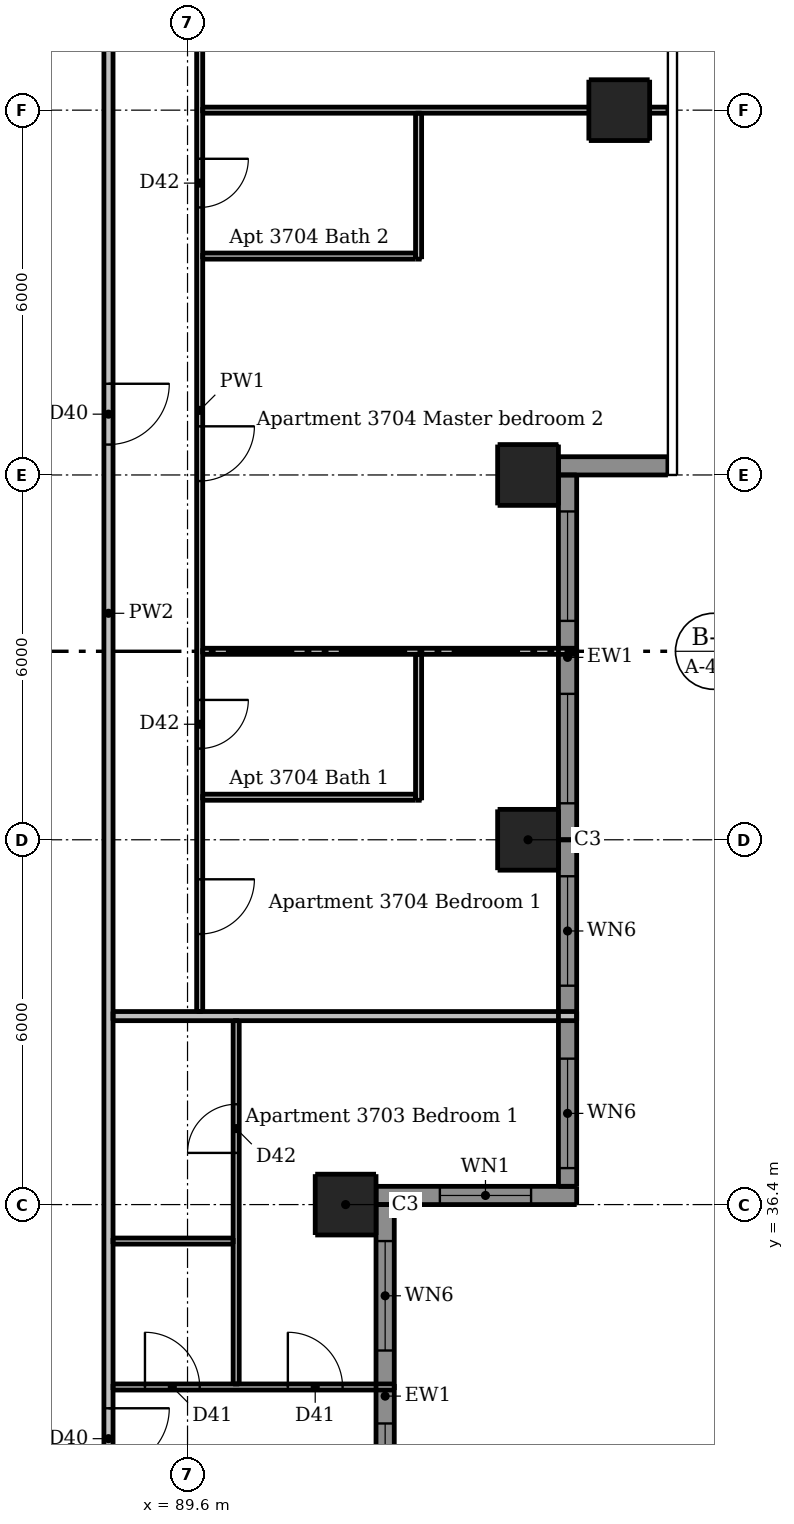
"""IFC4 building model, lengths in metres.
Left out: names, types, materials, properties, quantities, classifications, styles, units other than length and angle.
Written with IfcOpenShell. Run it as: python <this file> out.ifc"""

import sys

from ifc_helpers import new_model, si_unit, direction, frame, frame_2d, origin, origin_2d, place, context, subcontext, project, spatial, rectangle, extrude, element, fill, save


model = new_model("IFC4")
c1 = context("Model", 3, precision=1e-05, world=origin(), true_north=direction((0.0, 1.0)))
c2 = subcontext(c1, "Body", "Model", "MODEL_VIEW")
j1 = project(units=[si_unit("LENGTHUNIT", "METRE"), si_unit("PLANEANGLEUNIT", "RADIAN")], contexts=[c1])
p1 = place(None, origin())
s1 = spatial("IfcSite", under=j1, at=p1, CompositionType="ELEMENT")
p2 = place(p1, origin())
s2 = spatial("IfcBuilding", under=s1, at=p2, CompositionType="ELEMENT")
p3 = place(p2, frame((0.0, 0.0, 140.5)))
s3 = spatial("IfcBuildingStorey", under=s2, at=p3, CompositionType="ELEMENT", Elevation=140.5)
for number, where, z_axis, x_axis in (
    (1, (92.2, 36.4, 0.0), (0.0, 0.0, 1.0), (1.0, 0.0, 0.0)),
    (2, (95.2, 42.4, 0.0), (0.0, 0.0, 1.0), (1.0, 0.0, 0.0)),
    (3, (95.2, 48.4, 0.0), (0.0, 0.0, 1.0), (1.0, 0.0, 0.0)),
    (4, (96.7, 54.4, 0.0), (0.0, 0.0, 1.0), (1.0, 0.0, 0.0)),
):
    element("IfcColumn", number, at=place(p3, frame(where, z_axis=z_axis, x_axis=x_axis)), inside=s3, PredefinedType="COLUMN", context=c2, shape_type="SweptSolid", body=[
        extrude(rectangle(XDim=1.0, YDim=1.0, at=origin_2d()), origin(), (0.0, 0.0, 1.0), 3.05),
    ])
p4 = place(p3, frame((92.7, 36.55, 0.0), z_axis=(0.0, 0.0, 1.0), x_axis=(1.0, 0.0, 0.0)))
e5 = element("IfcWall", 5, at=p4, inside=s3, PredefinedType="SOLIDWALL", context=c2, shape_type="SweptSolid", body=[
    extrude(rectangle(XDim=3.3, YDim=0.3, at=frame_2d((1.65, 0.0))), origin(), (0.0, 0.0, 1.0), 3.05),
])
p5 = place(p4, frame((1.05, 0.0, 0.9)))
e6 = element("IfcOpeningElement", 6, at=p5, cuts=e5, PredefinedType="OPENING", context=c2, shape_type="SweptSolid", body=[
    extrude(rectangle(XDim=1.5, YDim=1.5, at=frame_2d((0.75, 0.75))), frame((0.0, 0.16, 0.0), z_axis=(0.0, -1.0, 0.0), x_axis=(1.0, 0.0, 0.0)), (0.0, 0.0, 1.0), 0.32),
])
p6 = place(p3, frame((95.7, 48.55, 0.0), z_axis=(0.0, 0.0, 1.0), x_axis=(1.0, 0.0, 0.0)))
e7 = element("IfcWall", 7, at=p6, inside=s3, PredefinedType="SOLIDWALL", context=c2, shape_type="SweptSolid", body=[
    extrude(rectangle(XDim=1.8, YDim=0.3, at=frame_2d((0.9, 0.0))), origin(), (0.0, 0.0, 1.0), 3.05),
])
p7 = place(p3, frame((92.85, 30.1, 0.0), z_axis=(0.0, 0.0, 1.0), x_axis=(0.0, 1.0, 0.0)))
e8 = element("IfcWall", 8, at=p7, inside=s3, PredefinedType="SOLIDWALL", context=c2, shape_type="SweptSolid", body=[
    extrude(rectangle(XDim=6.3, YDim=0.3, at=frame_2d((3.15, 0.0))), origin(), (0.0, 0.0, 1.0), 3.05),
])
p8 = place(p7, frame((0.9, 0.0, 0.15)))
e9 = element("IfcOpeningElement", 9, at=p8, cuts=e8, PredefinedType="OPENING", context=c2, shape_type="SweptSolid", body=[
    extrude(rectangle(XDim=1.8, YDim=2.1, at=frame_2d((0.9, 1.05))), frame((0.0, 0.16, 0.0), z_axis=(0.0, -1.0, 0.0), x_axis=(1.0, 0.0, 0.0)), (0.0, 0.0, 1.0), 0.32),
])
p9 = place(p7, frame((3.9, 0.0, 0.15)))
e10 = element("IfcOpeningElement", 10, at=p9, cuts=e8, PredefinedType="OPENING", context=c2, shape_type="SweptSolid", body=[
    extrude(rectangle(XDim=1.8, YDim=2.1, at=frame_2d((0.9, 1.05))), frame((0.0, 0.16, 0.0), z_axis=(0.0, -1.0, 0.0), x_axis=(1.0, 0.0, 0.0)), (0.0, 0.0, 1.0), 0.32),
])
p10 = place(p3, frame((95.85, 36.7, 0.0), z_axis=(0.0, 0.0, 1.0), x_axis=(0.0, 1.0, 0.0)))
e11 = element("IfcWall", 11, at=p10, inside=s3, PredefinedType="SOLIDWALL", context=c2, shape_type="SweptSolid", body=[
    extrude(rectangle(XDim=5.7, YDim=0.3, at=frame_2d((2.85, 0.0))), origin(), (0.0, 0.0, 1.0), 3.05),
])
p11 = place(p10, frame((0.3, 0.0, 0.15)))
e12 = element("IfcOpeningElement", 12, at=p11, cuts=e11, PredefinedType="OPENING", context=c2, shape_type="SweptSolid", body=[
    extrude(rectangle(XDim=1.8, YDim=2.1, at=frame_2d((0.9, 1.05))), frame((0.0, 0.16, 0.0), z_axis=(0.0, -1.0, 0.0), x_axis=(1.0, 0.0, 0.0)), (0.0, 0.0, 1.0), 0.32),
])
p12 = place(p10, frame((3.3, 0.0, 0.15)))
e13 = element("IfcOpeningElement", 13, at=p12, cuts=e11, PredefinedType="OPENING", context=c2, shape_type="SweptSolid", body=[
    extrude(rectangle(XDim=1.8, YDim=2.1, at=frame_2d((0.9, 1.05))), frame((0.0, 0.16, 0.0), z_axis=(0.0, -1.0, 0.0), x_axis=(1.0, 0.0, 0.0)), (0.0, 0.0, 1.0), 0.32),
])
p13 = place(p3, frame((95.85, 42.4, 0.0), z_axis=(0.0, 0.0, 1.0), x_axis=(0.0, 1.0, 0.0)))
e14 = element("IfcWall", 14, at=p13, inside=s3, PredefinedType="SOLIDWALL", context=c2, shape_type="SweptSolid", body=[
    extrude(rectangle(XDim=6.0, YDim=0.3, at=frame_2d((3.0, 0.0))), origin(), (0.0, 0.0, 1.0), 3.05),
])
p14 = place(p13, frame((0.6, 0.0, 0.15)))
e15 = element("IfcOpeningElement", 15, at=p14, cuts=e14, PredefinedType="OPENING", context=c2, shape_type="SweptSolid", body=[
    extrude(rectangle(XDim=1.8, YDim=2.1, at=frame_2d((0.9, 1.05))), frame((0.0, 0.16, 0.0), z_axis=(0.0, -1.0, 0.0), x_axis=(1.0, 0.0, 0.0)), (0.0, 0.0, 1.0), 0.32),
])
p15 = place(p13, frame((3.6, 0.0, 0.15)))
e16 = element("IfcOpeningElement", 16, at=p15, cuts=e14, PredefinedType="OPENING", context=c2, shape_type="SweptSolid", body=[
    extrude(rectangle(XDim=1.8, YDim=2.1, at=frame_2d((0.9, 1.05))), frame((0.0, 0.16, 0.0), z_axis=(0.0, -1.0, 0.0), x_axis=(1.0, 0.0, 0.0)), (0.0, 0.0, 1.0), 0.32),
])
p16 = place(p3, frame((89.8, 59.35, 0.0), z_axis=(0.0, 0.0, 1.0), x_axis=(0.0, -1.0, 0.0)))
e17 = element("IfcWall", 17, at=p16, inside=s3, PredefinedType="PARTITIONING", context=c2, shape_type="SweptSolid", body=[
    extrude(rectangle(XDim=19.775, YDim=0.1, at=frame_2d((9.888, 0.0))), origin(), (0.0, 0.0, 1.0), 3.05),
])
p17 = place(p16, frame((2.7, 0.0, 0.0)))
e18 = element("IfcOpeningElement", 18, at=p17, cuts=e17, PredefinedType="OPENING", context=c2, shape_type="SweptSolid", body=[
    extrude(rectangle(XDim=0.9, YDim=2.1, at=frame_2d((0.45, 1.05))), frame((0.0, 0.06, 0.0), z_axis=(0.0, -1.0, 0.0), x_axis=(1.0, 0.0, 0.0)), (0.0, 0.0, 1.0), 0.12),
])
p18 = place(p16, frame((17.6, 0.0, 0.0)))
e19 = element("IfcOpeningElement", 19, at=p18, cuts=e17, PredefinedType="OPENING", context=c2, shape_type="SweptSolid", body=[
    extrude(rectangle(XDim=0.9, YDim=2.1, at=frame_2d((0.45, 1.05))), frame((0.0, 0.06, 0.0), z_axis=(0.0, -1.0, 0.0), x_axis=(1.0, 0.0, 0.0)), (0.0, 0.0, 1.0), 0.12),
])
p19 = place(p16, frame((10.15, 0.0, 0.0)))
e20 = element("IfcOpeningElement", 20, at=p19, cuts=e17, PredefinedType="OPENING", context=c2, shape_type="SweptSolid", body=[
    extrude(rectangle(XDim=0.9, YDim=2.1, at=frame_2d((0.45, 1.05))), frame((0.0, 0.06, 0.0), z_axis=(0.0, -1.0, 0.0), x_axis=(1.0, 0.0, 0.0)), (0.0, 0.0, 1.0), 0.12),
])
p20 = place(p16, frame((14.65, 0.0, 0.0)))
e21 = element("IfcOpeningElement", 21, at=p20, cuts=e17, PredefinedType="OPENING", context=c2, shape_type="SweptSolid", body=[
    extrude(rectangle(XDim=0.8, YDim=2.1, at=frame_2d((0.4, 1.05))), frame((0.0, 0.06, 0.0), z_axis=(0.0, -1.0, 0.0), x_axis=(1.0, 0.0, 0.0)), (0.0, 0.0, 1.0), 0.12),
])
p21 = place(p16, frame((5.75, 0.0, 0.0)))
e22 = element("IfcOpeningElement", 22, at=p21, cuts=e17, PredefinedType="OPENING", context=c2, shape_type="SweptSolid", body=[
    extrude(rectangle(XDim=0.8, YDim=2.1, at=frame_2d((0.4, 1.05))), frame((0.0, 0.06, 0.0), z_axis=(0.0, -1.0, 0.0), x_axis=(1.0, 0.0, 0.0)), (0.0, 0.0, 1.0), 0.12),
])
p22 = place(p3, frame((90.4, 33.45, 0.0), z_axis=(0.0, 0.0, 1.0), x_axis=(0.0, 1.0, 0.0)))
e23 = element("IfcWall", 23, at=p22, inside=s3, PredefinedType="PARTITIONING", context=c2, shape_type="SweptSolid", body=[
    extrude(rectangle(XDim=5.975, YDim=0.1, at=frame_2d((2.988, 0.0))), origin(), (0.0, 0.0, 1.0), 3.05),
])
p23 = place(p22, frame((3.8, 0.0, 0.0)))
e24 = element("IfcOpeningElement", 24, at=p23, cuts=e23, PredefinedType="OPENING", context=c2, shape_type="SweptSolid", body=[
    extrude(rectangle(XDim=0.8, YDim=2.1, at=frame_2d((0.4, 1.05))), frame((0.0, 0.06, 0.0), z_axis=(0.0, -1.0, 0.0), x_axis=(1.0, 0.0, 0.0)), (0.0, 0.0, 1.0), 0.12),
])
p24 = place(p3, frame((93.4, 43.05, 0.0), z_axis=(0.0, 0.0, 1.0), x_axis=(0.0, 1.0, 0.0)))
e25 = element("IfcWall", 25, at=p24, inside=s3, PredefinedType="PARTITIONING", context=c2, shape_type="SweptSolid", body=[
    extrude(rectangle(XDim=2.4, YDim=0.1, at=frame_2d((1.2, 0.0))), origin(), (0.0, 0.0, 1.0), 3.05),
])
p25 = place(p3, frame((93.4, 51.95, 0.0), z_axis=(0.0, 0.0, 1.0), x_axis=(0.0, 1.0, 0.0)))
e26 = element("IfcWall", 26, at=p25, inside=s3, PredefinedType="PARTITIONING", context=c2, shape_type="SweptSolid", body=[
    extrude(rectangle(XDim=2.4, YDim=0.1, at=frame_2d((1.2, 0.0))), origin(), (0.0, 0.0, 1.0), 3.05),
])
p26 = place(p3, frame((89.85, 54.4, 0.0), z_axis=(0.0, 0.0, 1.0), x_axis=(1.0, 0.0, 0.0)))
e27 = element("IfcWall", 27, at=p26, inside=s3, PredefinedType="PARTITIONING", context=c2, shape_type="SweptSolid", body=[
    extrude(rectangle(XDim=7.65, YDim=0.1, at=frame_2d((3.825, 0.0))), origin(), (0.0, 0.0, 1.0), 2.516),
])
p27 = place(p3, frame((89.85, 52.0, 0.0), z_axis=(0.0, 0.0, 1.0), x_axis=(1.0, 0.0, 0.0)))
e28 = element("IfcWall", 28, at=p27, inside=s3, PredefinedType="PARTITIONING", context=c2, shape_type="SweptSolid", body=[
    extrude(rectangle(XDim=3.5, YDim=0.1, at=frame_2d((1.75, 0.0))), origin(), (0.0, 0.0, 1.0), 3.05),
])
p28 = place(p3, frame((89.85, 45.5, 0.0), z_axis=(0.0, 0.0, 1.0), x_axis=(1.0, 0.0, 0.0)))
e29 = element("IfcWall", 29, at=p28, inside=s3, PredefinedType="PARTITIONING", context=c2, shape_type="SweptSolid", body=[
    extrude(rectangle(XDim=6.15, YDim=0.1, at=frame_2d((3.075, 0.0))), origin(), (0.0, 0.0, 1.0), 3.05),
])
p29 = place(p3, frame((89.85, 43.1, 0.0), z_axis=(0.0, 0.0, 1.0), x_axis=(1.0, 0.0, 0.0)))
e30 = element("IfcWall", 30, at=p29, inside=s3, PredefinedType="PARTITIONING", context=c2, shape_type="SweptSolid", body=[
    extrude(rectangle(XDim=3.5, YDim=0.1, at=frame_2d((1.75, 0.0))), origin(), (0.0, 0.0, 1.0), 3.05),
])
p30 = place(p3, frame((88.375, 35.8, 0.0), z_axis=(0.0, 0.0, 1.0), x_axis=(1.0, 0.0, 0.0)))
e31 = element("IfcWall", 31, at=p30, inside=s3, PredefinedType="PARTITIONING", context=c2, shape_type="SweptSolid", body=[
    extrude(rectangle(XDim=1.975, YDim=0.1, at=frame_2d((0.988, 0.0))), origin(), (0.0, 0.0, 1.0), 3.05),
])
p31 = place(p3, frame((88.375, 33.4, 0.0), z_axis=(0.0, 0.0, 1.0), x_axis=(1.0, 0.0, 0.0)))
e32 = element("IfcWall", 32, at=p31, inside=s3, PredefinedType="PARTITIONING", context=c2, shape_type="SweptSolid", body=[
    extrude(rectangle(XDim=4.625, YDim=0.1, at=frame_2d((2.312, 0.0))), origin(), (0.0, 0.0, 1.0), 3.05),
])
p32 = place(p31, frame((0.525, 0.0, 0.0)))
e33 = element("IfcOpeningElement", 33, at=p32, cuts=e32, PredefinedType="OPENING", context=c2, shape_type="SweptSolid", body=[
    extrude(rectangle(XDim=0.9, YDim=2.1, at=frame_2d((0.45, 1.05))), frame((0.0, 0.06, 0.0), z_axis=(0.0, -1.0, 0.0), x_axis=(1.0, 0.0, 0.0)), (0.0, 0.0, 1.0), 0.12),
])
p33 = place(p31, frame((2.875, 0.0, 0.0)))
e34 = element("IfcOpeningElement", 34, at=p33, cuts=e32, PredefinedType="OPENING", context=c2, shape_type="SweptSolid", body=[
    extrude(rectangle(XDim=0.9, YDim=2.1, at=frame_2d((0.45, 1.05))), frame((0.0, 0.06, 0.0), z_axis=(0.0, -1.0, 0.0), x_axis=(1.0, 0.0, 0.0)), (0.0, 0.0, 1.0), 0.12),
])
p34 = place(p3, frame((88.3, 60.475, 0.0), z_axis=(0.0, 0.0, 1.0), x_axis=(0.0, -1.0, 0.0)))
e35 = element("IfcWall", 35, at=p34, inside=s3, PredefinedType="PARTITIONING", context=c2, shape_type="SweptSolid", body=[
    extrude(rectangle(XDim=28.7, YDim=0.15, at=frame_2d((14.35, 0.0))), origin(), (0.0, 0.0, 1.0), 3.05),
])
p35 = place(p34, frame((27.425, 0.0, 0.0)))
e36 = element("IfcOpeningElement", 36, at=p35, cuts=e35, PredefinedType="OPENING", context=c2, shape_type="SweptSolid", body=[
    extrude(rectangle(XDim=1.0, YDim=2.1, at=frame_2d((0.5, 1.05))), frame((0.0, 0.085, 0.0), z_axis=(0.0, -1.0, 0.0), x_axis=(1.0, 0.0, 0.0)), (0.0, 0.0, 1.0), 0.17),
])
p36 = place(p34, frame((10.575, 0.0, 0.0)))
e37 = element("IfcOpeningElement", 37, at=p36, cuts=e35, PredefinedType="OPENING", context=c2, shape_type="SweptSolid", body=[
    extrude(rectangle(XDim=1.0, YDim=2.1, at=frame_2d((0.5, 1.05))), frame((0.0, 0.085, 0.0), z_axis=(0.0, -1.0, 0.0), x_axis=(1.0, 0.0, 0.0)), (0.0, 0.0, 1.0), 0.17),
])
p37 = place(p3, frame((88.375, 39.5, 0.0), z_axis=(0.0, 0.0, 1.0), x_axis=(1.0, 0.0, 0.0)))
e38 = element("IfcWall", 38, at=p37, inside=s3, PredefinedType="PARTITIONING", context=c2, shape_type="SweptSolid", body=[
    extrude(rectangle(XDim=7.625, YDim=0.15, at=frame_2d((3.812, 0.0))), origin(), (0.0, 0.0, 1.0), 3.05),
])
p38 = place(p5, origin())
e39 = element("IfcWindow", 39, at=p38, inside=s3, PartitioningType="DOUBLE_PANEL_VERTICAL", PredefinedType="WINDOW", context=c2, shape_type="SweptSolid", body=[
    extrude(rectangle(XDim=1.5, YDim=1.5, at=frame_2d((0.75, 0.75))), frame((0.0, 0.03, 0.0), z_axis=(0.0, -1.0, 0.0), x_axis=(1.0, 0.0, 0.0)), (0.0, 0.0, 1.0), 0.06),
])
fill(e6, e39)
p39 = place(p8, origin())
e40 = element("IfcWindow", 40, at=p39, inside=s3, PartitioningType="DOUBLE_PANEL_VERTICAL", PredefinedType="WINDOW", context=c2, shape_type="SweptSolid", body=[
    extrude(rectangle(XDim=1.8, YDim=2.1, at=frame_2d((0.9, 1.05))), frame((0.0, 0.03, 0.0), z_axis=(0.0, -1.0, 0.0), x_axis=(1.0, 0.0, 0.0)), (0.0, 0.0, 1.0), 0.06),
])
fill(e9, e40)
p40 = place(p9, origin())
e41 = element("IfcWindow", 41, at=p40, inside=s3, PartitioningType="DOUBLE_PANEL_VERTICAL", PredefinedType="WINDOW", context=c2, shape_type="SweptSolid", body=[
    extrude(rectangle(XDim=1.8, YDim=2.1, at=frame_2d((0.9, 1.05))), frame((0.0, 0.03, 0.0), z_axis=(0.0, -1.0, 0.0), x_axis=(1.0, 0.0, 0.0)), (0.0, 0.0, 1.0), 0.06),
])
fill(e10, e41)
p41 = place(p11, origin())
e42 = element("IfcWindow", 42, at=p41, inside=s3, PartitioningType="DOUBLE_PANEL_VERTICAL", PredefinedType="WINDOW", context=c2, shape_type="SweptSolid", body=[
    extrude(rectangle(XDim=1.8, YDim=2.1, at=frame_2d((0.9, 1.05))), frame((0.0, 0.03, 0.0), z_axis=(0.0, -1.0, 0.0), x_axis=(1.0, 0.0, 0.0)), (0.0, 0.0, 1.0), 0.06),
])
fill(e12, e42)
p42 = place(p12, origin())
e43 = element("IfcWindow", 43, at=p42, inside=s3, PartitioningType="DOUBLE_PANEL_VERTICAL", PredefinedType="WINDOW", context=c2, shape_type="SweptSolid", body=[
    extrude(rectangle(XDim=1.8, YDim=2.1, at=frame_2d((0.9, 1.05))), frame((0.0, 0.03, 0.0), z_axis=(0.0, -1.0, 0.0), x_axis=(1.0, 0.0, 0.0)), (0.0, 0.0, 1.0), 0.06),
])
fill(e13, e43)
p43 = place(p14, origin())
e44 = element("IfcWindow", 44, at=p43, inside=s3, PartitioningType="DOUBLE_PANEL_VERTICAL", PredefinedType="WINDOW", context=c2, shape_type="SweptSolid", body=[
    extrude(rectangle(XDim=1.8, YDim=2.1, at=frame_2d((0.9, 1.05))), frame((0.0, 0.03, 0.0), z_axis=(0.0, -1.0, 0.0), x_axis=(1.0, 0.0, 0.0)), (0.0, 0.0, 1.0), 0.06),
])
fill(e15, e44)
p44 = place(p15, origin())
e45 = element("IfcWindow", 45, at=p44, inside=s3, PartitioningType="DOUBLE_PANEL_VERTICAL", PredefinedType="WINDOW", context=c2, shape_type="SweptSolid", body=[
    extrude(rectangle(XDim=1.8, YDim=2.1, at=frame_2d((0.9, 1.05))), frame((0.0, 0.03, 0.0), z_axis=(0.0, -1.0, 0.0), x_axis=(1.0, 0.0, 0.0)), (0.0, 0.0, 1.0), 0.06),
])
fill(e16, e45)
p45 = place(p35, origin())
e46 = element("IfcDoor", 46, at=p45, inside=s3, OperationType="SINGLE_SWING_LEFT", PredefinedType="DOOR", context=c2, shape_type="SweptSolid", body=[
    extrude(rectangle(XDim=1.0, YDim=2.1, at=frame_2d((0.5, 1.05))), frame((0.0, 0.025, 0.0), z_axis=(0.0, -1.0, 0.0), x_axis=(1.0, 0.0, 0.0)), (0.0, 0.0, 1.0), 0.05),
])
fill(e36, e46)
p46 = place(p32, origin())
e47 = element("IfcDoor", 47, at=p46, inside=s3, OperationType="SINGLE_SWING_LEFT", PredefinedType="DOOR", context=c2, shape_type="SweptSolid", body=[
    extrude(rectangle(XDim=0.9, YDim=2.1, at=frame_2d((0.45, 1.05))), frame((0.0, 0.025, 0.0), z_axis=(0.0, -1.0, 0.0), x_axis=(1.0, 0.0, 0.0)), (0.0, 0.0, 1.0), 0.05),
])
fill(e33, e47)
p47 = place(p33, origin())
e48 = element("IfcDoor", 48, at=p47, inside=s3, OperationType="SINGLE_SWING_LEFT", PredefinedType="DOOR", context=c2, shape_type="SweptSolid", body=[
    extrude(rectangle(XDim=0.9, YDim=2.1, at=frame_2d((0.45, 1.05))), frame((0.0, 0.025, 0.0), z_axis=(0.0, -1.0, 0.0), x_axis=(1.0, 0.0, 0.0)), (0.0, 0.0, 1.0), 0.05),
])
fill(e34, e48)
p48 = place(p23, origin())
e49 = element("IfcDoor", 49, at=p48, inside=s3, OperationType="SINGLE_SWING_LEFT", PredefinedType="DOOR", context=c2, shape_type="SweptSolid", body=[
    extrude(rectangle(XDim=0.8, YDim=2.1, at=frame_2d((0.4, 1.05))), frame((0.0, 0.025, 0.0), z_axis=(0.0, -1.0, 0.0), x_axis=(1.0, 0.0, 0.0)), (0.0, 0.0, 1.0), 0.05),
])
fill(e24, e49)
p49 = place(p36, origin())
e50 = element("IfcDoor", 50, at=p49, inside=s3, OperationType="SINGLE_SWING_LEFT", PredefinedType="DOOR", context=c2, shape_type="SweptSolid", body=[
    extrude(rectangle(XDim=1.0, YDim=2.1, at=frame_2d((0.5, 1.05))), frame((0.0, 0.025, 0.0), z_axis=(0.0, -1.0, 0.0), x_axis=(1.0, 0.0, 0.0)), (0.0, 0.0, 1.0), 0.05),
])
fill(e37, e50)
p50 = place(p18, origin())
e51 = element("IfcDoor", 51, at=p50, inside=s3, OperationType="SINGLE_SWING_LEFT", PredefinedType="DOOR", context=c2, shape_type="SweptSolid", body=[
    extrude(rectangle(XDim=0.9, YDim=2.1, at=frame_2d((0.45, 1.05))), frame((0.0, 0.025, 0.0), z_axis=(0.0, -1.0, 0.0), x_axis=(1.0, 0.0, 0.0)), (0.0, 0.0, 1.0), 0.05),
])
fill(e19, e51)
p51 = place(p19, origin())
e52 = element("IfcDoor", 52, at=p51, inside=s3, OperationType="SINGLE_SWING_LEFT", PredefinedType="DOOR", context=c2, shape_type="SweptSolid", body=[
    extrude(rectangle(XDim=0.9, YDim=2.1, at=frame_2d((0.45, 1.05))), frame((0.0, 0.025, 0.0), z_axis=(0.0, -1.0, 0.0), x_axis=(1.0, 0.0, 0.0)), (0.0, 0.0, 1.0), 0.05),
])
fill(e20, e52)
p52 = place(p20, origin())
e53 = element("IfcDoor", 53, at=p52, inside=s3, OperationType="SINGLE_SWING_LEFT", PredefinedType="DOOR", context=c2, shape_type="SweptSolid", body=[
    extrude(rectangle(XDim=0.8, YDim=2.1, at=frame_2d((0.4, 1.05))), frame((0.0, 0.025, 0.0), z_axis=(0.0, -1.0, 0.0), x_axis=(1.0, 0.0, 0.0)), (0.0, 0.0, 1.0), 0.05),
])
fill(e21, e53)
p53 = place(p21, origin())
e54 = element("IfcDoor", 54, at=p53, inside=s3, OperationType="SINGLE_SWING_LEFT", PredefinedType="DOOR", context=c2, shape_type="SweptSolid", body=[
    extrude(rectangle(XDim=0.8, YDim=2.1, at=frame_2d((0.4, 1.05))), frame((0.0, 0.025, 0.0), z_axis=(0.0, -1.0, 0.0), x_axis=(1.0, 0.0, 0.0)), (0.0, 0.0, 1.0), 0.05),
])
fill(e22, e54)
save(model, sys.argv[1])
